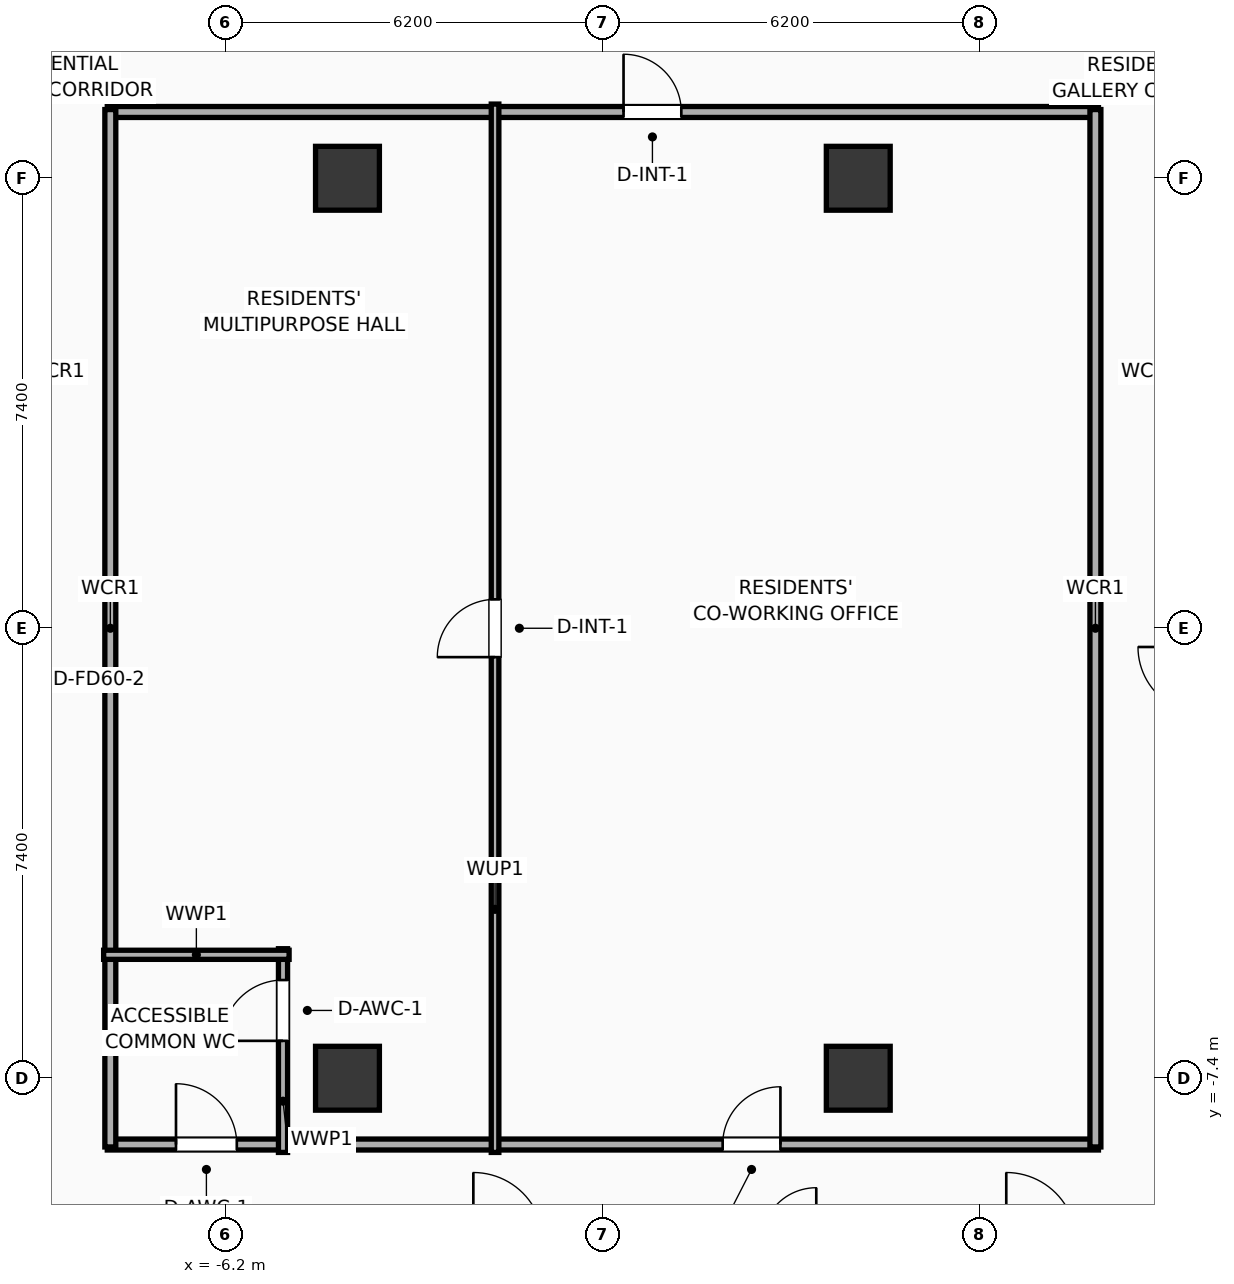
"""IFC4 building model, lengths in metres.
Left out: names, types, materials, properties, quantities, classifications, styles, units other than length and angle.
Written with IfcOpenShell. Run it as: python <this file> out.ifc"""

import sys

from ifc_helpers import new_model, si_unit, direction, frame, frame_2d, origin, origin_2d, place, context, subcontext, project, spatial, rectangle, extrude, element, fill, save


model = new_model("IFC4")
c1 = context("Model", 3, precision=1e-05, world=origin(), true_north=direction((0.0, 1.0)))
c2 = subcontext(c1, "Body", "Model", "MODEL_VIEW")
j1 = project(units=[si_unit("LENGTHUNIT", "METRE"), si_unit("PLANEANGLEUNIT", "RADIAN")], contexts=[c1])
p1 = place(None, origin())
s1 = spatial("IfcSite", under=j1, at=p1, CompositionType="ELEMENT")
p2 = place(p1, origin())
s2 = spatial("IfcBuilding", under=s1, at=p2, CompositionType="ELEMENT")
p3 = place(p2, frame((0.0, 0.0, 45.5)))
s3 = spatial("IfcBuildingStorey", under=s2, at=p3, CompositionType="ELEMENT", Elevation=45.5)
for number, where, z_axis, x_axis in (
    (1, (-4.2, -7.4, 0.0), (0.0, 0.0, 1.0), (1.0, 0.0, 0.0)),
    (2, (-4.2, 7.4, 0.0), (0.0, 0.0, 1.0), (1.0, 0.0, 0.0)),
    (3, (4.2, -7.4, 0.0), (0.0, 0.0, 1.0), (1.0, 0.0, 0.0)),
    (4, (4.2, 7.4, 0.0), (0.0, 0.0, 1.0), (1.0, 0.0, 0.0)),
):
    element("IfcColumn", number, at=place(p3, frame(where, z_axis=z_axis, x_axis=x_axis)), inside=s3, PredefinedType="COLUMN", context=c2, shape_type="SweptSolid", body=[
        extrude(rectangle(XDim=1.05, YDim=1.05, at=origin_2d()), origin(), (0.0, 0.0, 1.0), 3.9),
    ])
p4 = place(p3, frame((-8.15, 8.49, 0.0), z_axis=(0.0, 0.0, 1.0), x_axis=(1.0, 0.0, 0.0)))
e5 = element("IfcWall", 5, at=p4, inside=s3, PredefinedType="PARTITIONING", context=c2, shape_type="SweptSolid", body=[
    extrude(rectangle(XDim=16.3, YDim=0.18, at=frame_2d((8.15, 0.0))), origin(), (0.0, 0.0, 1.0), 3.65),
])
p5 = place(p4, frame((8.49, 0.0, 0.0)))
e6 = element("IfcOpeningElement", 6, at=p5, cuts=e5, PredefinedType="OPENING", context=c2, shape_type="SweptSolid", body=[
    extrude(rectangle(XDim=0.95, YDim=2.05, at=frame_2d((0.475, 1.025))), frame((0.0, 0.1, 0.0), z_axis=(0.0, -1.0, 0.0), x_axis=(1.0, 0.0, 0.0)), (0.0, 0.0, 1.0), 0.2),
])
p6 = place(p3, frame((-8.15, -8.49, 0.0), z_axis=(0.0, 0.0, 1.0), x_axis=(1.0, 0.0, 0.0)))
e7 = element("IfcWall", 7, at=p6, inside=s3, PredefinedType="PARTITIONING", context=c2, shape_type="SweptSolid", body=[
    extrude(rectangle(XDim=16.3, YDim=0.18, at=frame_2d((8.15, 0.0))), origin(), (0.0, 0.0, 1.0), 3.65),
])
p7 = place(p6, frame((1.13, 0.0, 0.0)))
e8 = element("IfcOpeningElement", 8, at=p7, cuts=e7, PredefinedType="OPENING", context=c2, shape_type="SweptSolid", body=[
    extrude(rectangle(XDim=1.0, YDim=2.05, at=frame_2d((0.5, 1.025))), frame((0.0, 0.1, 0.0), z_axis=(0.0, -1.0, 0.0), x_axis=(1.0, 0.0, 0.0)), (0.0, 0.0, 1.0), 0.2),
])
p8 = place(p6, frame((10.12, 0.0, 0.0)))
e9 = element("IfcOpeningElement", 9, at=p8, cuts=e7, PredefinedType="OPENING", context=c2, shape_type="SweptSolid", body=[
    extrude(rectangle(XDim=0.95, YDim=2.05, at=frame_2d((0.475, 1.025))), frame((0.0, 0.1, 0.0), z_axis=(0.0, -1.0, 0.0), x_axis=(1.0, 0.0, 0.0)), (0.0, 0.0, 1.0), 0.2),
])
for number, where, z_axis, x_axis in (
    (10, (-8.1, -8.53, 0.0), (0.0, 0.0, 1.0), (0.0, 1.0, 0.0)),
    (11, (8.1, -8.53, 0.0), (0.0, 0.0, 1.0), (0.0, 1.0, 0.0)),
):
    element("IfcWall", number, at=place(p3, frame(where, z_axis=z_axis, x_axis=x_axis)), inside=s3, PredefinedType="PARTITIONING", context=c2, shape_type="SweptSolid", body=[
        extrude(rectangle(XDim=17.06, YDim=0.18, at=frame_2d((8.53, 0.0))), origin(), (0.0, 0.0, 1.0), 3.65),
    ])
p9 = place(p3, frame((-5.26, -8.62, 0.0), z_axis=(0.0, 0.0, 1.0), x_axis=(0.0, 1.0, 0.0)))
e12 = element("IfcWall", 12, at=p9, inside=s3, PredefinedType="PLUMBINGWALL", context=c2, shape_type="SweptSolid", body=[
    extrude(rectangle(XDim=3.35, YDim=0.15, at=frame_2d((1.675, 0.0))), origin(), (0.0, 0.0, 1.0), 3.65),
])
p10 = place(p9, frame((1.835, 0.0, 0.0)))
e13 = element("IfcOpeningElement", 13, at=p10, cuts=e12, PredefinedType="OPENING", context=c2, shape_type="SweptSolid", body=[
    extrude(rectangle(XDim=1.0, YDim=2.05, at=frame_2d((0.5, 1.025))), frame((0.0, 0.085, 0.0), z_axis=(0.0, -1.0, 0.0), x_axis=(1.0, 0.0, 0.0)), (0.0, 0.0, 1.0), 0.17),
])
p11 = place(p3, frame((-8.21, -5.37, 0.0), z_axis=(0.0, 0.0, 1.0), x_axis=(1.0, 0.0, 0.0)))
e14 = element("IfcWall", 14, at=p11, inside=s3, PredefinedType="PLUMBINGWALL", context=c2, shape_type="SweptSolid", body=[
    extrude(rectangle(XDim=3.05, YDim=0.15, at=frame_2d((1.525, 0.0))), origin(), (0.0, 0.0, 1.0), 3.65),
])
p12 = place(p3, frame((-1.773, -8.62, 0.0), z_axis=(0.0, 0.0, 1.0), x_axis=(0.0, 1.0, 0.0)))
e15 = element("IfcWall", 15, at=p12, inside=s3, PredefinedType="PARTITIONING", context=c2, shape_type="SweptSolid", body=[
    extrude(rectangle(XDim=17.24, YDim=0.125, at=frame_2d((8.62, 0.0))), origin(), (0.0, 0.0, 1.0), 3.65),
])
p13 = place(p12, frame((8.145, 0.0, 0.0)))
e16 = element("IfcOpeningElement", 16, at=p13, cuts=e15, PredefinedType="OPENING", context=c2, shape_type="SweptSolid", body=[
    extrude(rectangle(XDim=0.95, YDim=2.05, at=frame_2d((0.475, 1.025))), frame((0.0, 0.073, 0.0), z_axis=(0.0, -1.0, 0.0), x_axis=(1.0, 0.0, 0.0)), (0.0, 0.0, 1.0), 0.145),
])
p14 = place(p5, origin())
e17 = element("IfcDoor", 17, at=p14, inside=s3, OperationType="SINGLE_SWING_LEFT", PredefinedType="DOOR", context=c2, shape_type="SweptSolid", body=[
    extrude(rectangle(XDim=0.95, YDim=2.05, at=frame_2d((0.475, 1.025))), frame((0.0, 0.025, 0.0), z_axis=(0.0, -1.0, 0.0), x_axis=(1.0, 0.0, 0.0)), (0.0, 0.0, 1.0), 0.05),
])
fill(e6, e17)
p15 = place(p7, origin())
e18 = element("IfcDoor", 18, at=p15, inside=s3, OperationType="SINGLE_SWING_LEFT", PredefinedType="DOOR", context=c2, shape_type="SweptSolid", body=[
    extrude(rectangle(XDim=1.0, YDim=2.05, at=frame_2d((0.5, 1.025))), frame((0.0, 0.025, 0.0), z_axis=(0.0, -1.0, 0.0), x_axis=(1.0, 0.0, 0.0)), (0.0, 0.0, 1.0), 0.05),
])
fill(e8, e18)
p16 = place(p8, origin())
e19 = element("IfcDoor", 19, at=p16, inside=s3, OperationType="SINGLE_SWING_RIGHT", PredefinedType="DOOR", context=c2, shape_type="SweptSolid", body=[
    extrude(rectangle(XDim=0.95, YDim=2.05, at=frame_2d((0.475, 1.025))), frame((0.0, 0.025, 0.0), z_axis=(0.0, -1.0, 0.0), x_axis=(1.0, 0.0, 0.0)), (0.0, 0.0, 1.0), 0.05),
])
fill(e9, e19)
p17 = place(p10, origin())
e20 = element("IfcDoor", 20, at=p17, inside=s3, OperationType="SINGLE_SWING_LEFT", PredefinedType="DOOR", context=c2, shape_type="SweptSolid", body=[
    extrude(rectangle(XDim=1.0, YDim=2.05, at=frame_2d((0.5, 1.025))), frame((0.0, 0.025, 0.0), z_axis=(0.0, -1.0, 0.0), x_axis=(1.0, 0.0, 0.0)), (0.0, 0.0, 1.0), 0.05),
])
fill(e13, e20)
p18 = place(p13, origin())
e21 = element("IfcDoor", 21, at=p18, inside=s3, OperationType="SINGLE_SWING_LEFT", PredefinedType="DOOR", context=c2, shape_type="SweptSolid", body=[
    extrude(rectangle(XDim=0.95, YDim=2.05, at=frame_2d((0.475, 1.025))), frame((0.0, 0.025, 0.0), z_axis=(0.0, -1.0, 0.0), x_axis=(1.0, 0.0, 0.0)), (0.0, 0.0, 1.0), 0.05),
])
fill(e16, e21)
save(model, sys.argv[1])
